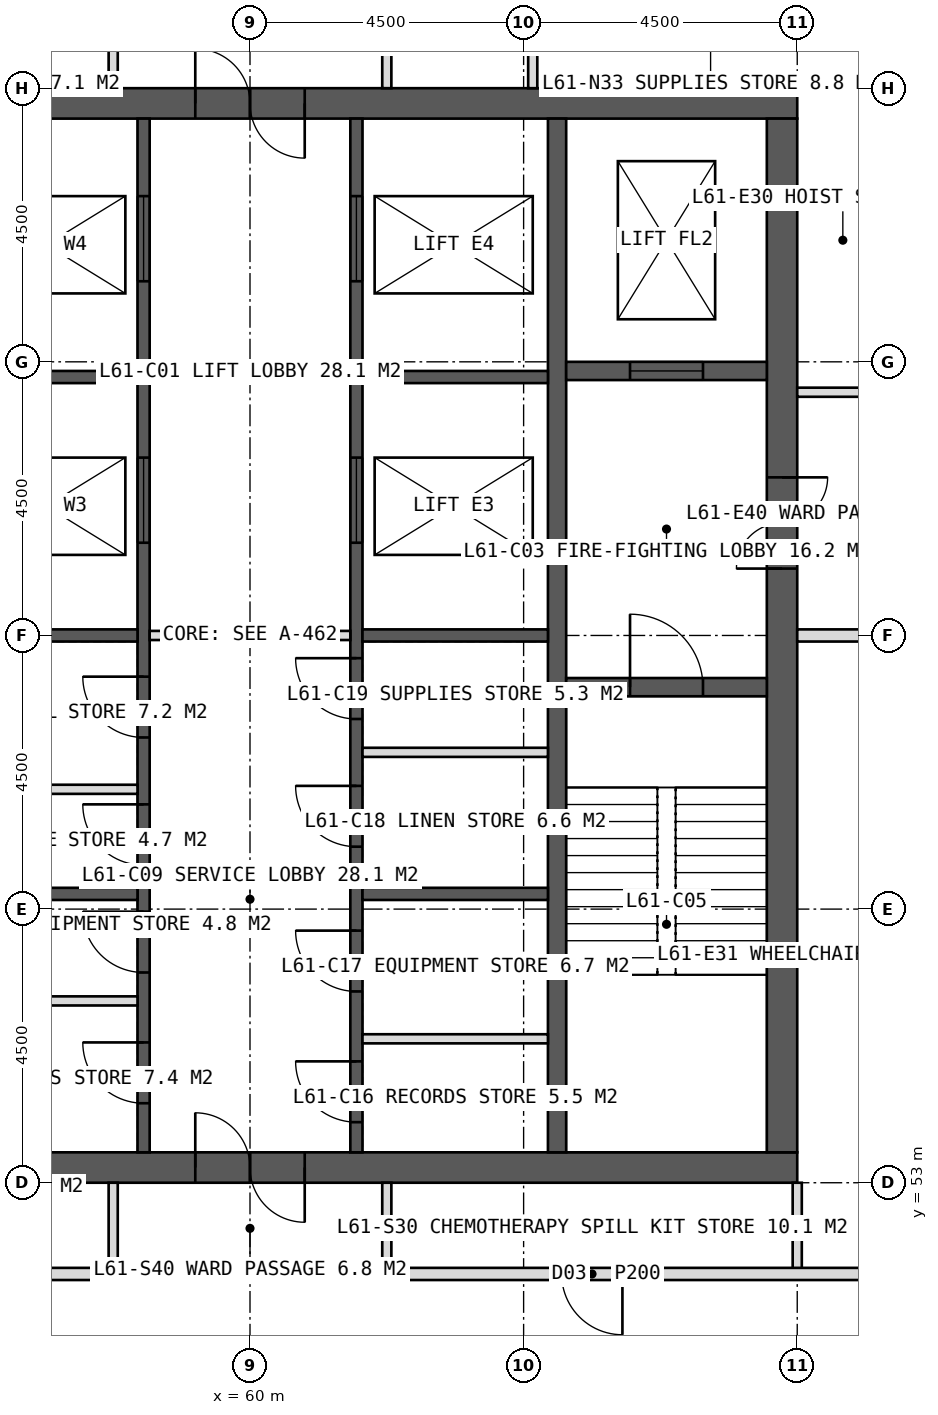
"""IFC4 building model, lengths in metres.
Left out: names, types, materials, properties, quantities, classifications, styles, units other than length and angle.
Written with IfcOpenShell. Run it as: python <this file> out.ifc"""

import sys

from ifc_helpers import new_model, si_unit, direction, frame, frame_2d, origin, place, context, subcontext, project, spatial, rectangle, extrude, element, fill, save


model = new_model("IFC4")
c1 = context("Model", 3, precision=1e-05, world=origin(), true_north=direction((0.0, 1.0)))
c2 = subcontext(c1, "Body", "Model", "MODEL_VIEW")
j1 = project(units=[si_unit("LENGTHUNIT", "METRE"), si_unit("PLANEANGLEUNIT", "RADIAN")], contexts=[c1])
p1 = place(None, origin())
s1 = spatial("IfcSite", under=j1, at=p1, CompositionType="ELEMENT")
p2 = place(p1, origin())
s2 = spatial("IfcBuilding", under=s1, at=p2, CompositionType="ELEMENT")
p3 = place(p2, frame((0.0, 0.0, 254.0)))
s3 = spatial("IfcBuildingStorey", under=s2, at=p3, CompositionType="ELEMENT", Elevation=254.0)
p4 = place(p3, frame((51.0, 70.75, 0.0), z_axis=(0.0, 0.0, 1.0), x_axis=(1.0, 0.0, 0.0)))
e1 = element("IfcWall", 1, at=p4, inside=s3, PredefinedType="SHEAR", context=c2, shape_type="SweptSolid", body=[
    extrude(rectangle(XDim=18.0, YDim=0.5, at=frame_2d((9.0, 0.0))), origin(), (0.0, 0.0, 1.0), 4.0),
])
p5 = place(p4, frame((8.1, 0.0, 0.0)))
e2 = element("IfcOpeningElement", 2, at=p5, cuts=e1, PredefinedType="OPENING", context=c2, shape_type="SweptSolid", body=[
    extrude(rectangle(XDim=1.8, YDim=2.2, at=frame_2d((0.9, 1.1))), frame((0.0, 0.26, 0.0), z_axis=(0.0, -1.0, 0.0), x_axis=(1.0, 0.0, 0.0)), (0.0, 0.0, 1.0), 0.52),
])
p6 = place(p3, frame((51.0, 53.25, 0.0), z_axis=(0.0, 0.0, 1.0), x_axis=(1.0, 0.0, 0.0)))
e3 = element("IfcWall", 3, at=p6, inside=s3, PredefinedType="SHEAR", context=c2, shape_type="SweptSolid", body=[
    extrude(rectangle(XDim=18.0, YDim=0.5, at=frame_2d((9.0, 0.0))), origin(), (0.0, 0.0, 1.0), 4.0),
])
p7 = place(p6, frame((8.1, 0.0, 0.0)))
e4 = element("IfcOpeningElement", 4, at=p7, cuts=e3, PredefinedType="OPENING", context=c2, shape_type="SweptSolid", body=[
    extrude(rectangle(XDim=1.8, YDim=2.2, at=frame_2d((0.9, 1.1))), frame((0.0, 0.26, 0.0), z_axis=(0.0, -1.0, 0.0), x_axis=(1.0, 0.0, 0.0)), (0.0, 0.0, 1.0), 0.52),
])
p8 = place(p3, frame((68.75, 53.5, 0.0), z_axis=(0.0, 0.0, 1.0), x_axis=(0.0, 1.0, 0.0)))
e5 = element("IfcWall", 5, at=p8, inside=s3, PredefinedType="SHEAR", context=c2, shape_type="SweptSolid", body=[
    extrude(rectangle(XDim=17.0, YDim=0.5, at=frame_2d((8.5, 0.0))), origin(), (0.0, 0.0, 1.0), 4.0),
])
p9 = place(p8, frame((9.6, 0.0, 0.0)))
e6 = element("IfcOpeningElement", 6, at=p9, cuts=e5, PredefinedType="OPENING", context=c2, shape_type="SweptSolid", body=[
    extrude(rectangle(XDim=1.5, YDim=2.2, at=frame_2d((0.75, 1.1))), frame((0.0, 0.26, 0.0), z_axis=(0.0, -1.0, 0.0), x_axis=(1.0, 0.0, 0.0)), (0.0, 0.0, 1.0), 0.52),
])
p10 = place(p3, frame((65.05, 53.5, 0.0), z_axis=(0.0, 0.0, 1.0), x_axis=(0.0, 1.0, 0.0)))
e7 = element("IfcWall", 7, at=p10, inside=s3, PredefinedType="SHEAR", context=c2, shape_type="SweptSolid", body=[
    extrude(rectangle(XDim=17.0, YDim=0.3, at=frame_2d((8.5, 0.0))), origin(), (0.0, 0.0, 1.0), 4.0),
])
p11 = place(p3, frame((58.25, 53.5, 0.0), z_axis=(0.0, 0.0, 1.0), x_axis=(0.0, 1.0, 0.0)))
e8 = element("IfcWall", 8, at=p11, inside=s3, PredefinedType="SHEAR", context=c2, shape_type="SweptSolid", body=[
    extrude(rectangle(XDim=17.0, YDim=0.2, at=frame_2d((8.5, 0.0))), origin(), (0.0, 0.0, 1.0), 4.0),
])
p12 = place(p11, frame((0.808, 0.0, 0.0)))
e9 = element("IfcOpeningElement", 9, at=p12, cuts=e8, PredefinedType="OPENING", context=c2, shape_type="SweptSolid", body=[
    extrude(rectangle(XDim=1.0, YDim=2.1, at=frame_2d((0.5, 1.05))), frame((0.0, 0.11, 0.0), z_axis=(0.0, -1.0, 0.0), x_axis=(1.0, 0.0, 0.0)), (0.0, 0.0, 1.0), 0.22),
])
p13 = place(p11, frame((2.958, 0.0, 0.0)))
e10 = element("IfcOpeningElement", 10, at=p13, cuts=e8, PredefinedType="OPENING", context=c2, shape_type="SweptSolid", body=[
    extrude(rectangle(XDim=1.0, YDim=2.1, at=frame_2d((0.5, 1.05))), frame((0.0, 0.11, 0.0), z_axis=(0.0, -1.0, 0.0), x_axis=(1.0, 0.0, 0.0)), (0.0, 0.0, 1.0), 0.22),
])
p14 = place(p11, frame((4.722, 0.0, 0.0)))
e11 = element("IfcOpeningElement", 11, at=p14, cuts=e8, PredefinedType="OPENING", context=c2, shape_type="SweptSolid", body=[
    extrude(rectangle(XDim=1.0, YDim=2.1, at=frame_2d((0.5, 1.05))), frame((0.0, 0.11, 0.0), z_axis=(0.0, -1.0, 0.0), x_axis=(1.0, 0.0, 0.0)), (0.0, 0.0, 1.0), 0.22),
])
p15 = place(p11, frame((6.823, 0.0, 0.0)))
e12 = element("IfcOpeningElement", 12, at=p15, cuts=e8, PredefinedType="OPENING", context=c2, shape_type="SweptSolid", body=[
    extrude(rectangle(XDim=1.0, YDim=2.1, at=frame_2d((0.5, 1.05))), frame((0.0, 0.11, 0.0), z_axis=(0.0, -1.0, 0.0), x_axis=(1.0, 0.0, 0.0)), (0.0, 0.0, 1.0), 0.22),
])
p16 = place(p11, frame((10.025, 0.0, 0.0)))
e13 = element("IfcOpeningElement", 13, at=p16, cuts=e8, PredefinedType="OPENING", context=c2, shape_type="SweptSolid", body=[
    extrude(rectangle(XDim=1.4, YDim=2.2, at=frame_2d((0.7, 1.1))), frame((0.0, 0.11, 0.0), z_axis=(0.0, -1.0, 0.0), x_axis=(1.0, 0.0, 0.0)), (0.0, 0.0, 1.0), 0.22),
])
p17 = place(p11, frame((14.325, 0.0, 0.0)))
e14 = element("IfcOpeningElement", 14, at=p17, cuts=e8, PredefinedType="OPENING", context=c2, shape_type="SweptSolid", body=[
    extrude(rectangle(XDim=1.4, YDim=2.2, at=frame_2d((0.7, 1.1))), frame((0.0, 0.11, 0.0), z_axis=(0.0, -1.0, 0.0), x_axis=(1.0, 0.0, 0.0)), (0.0, 0.0, 1.0), 0.22),
])
p18 = place(p3, frame((61.75, 53.5, 0.0), z_axis=(0.0, 0.0, 1.0), x_axis=(0.0, 1.0, 0.0)))
e15 = element("IfcWall", 15, at=p18, inside=s3, PredefinedType="SHEAR", context=c2, shape_type="SweptSolid", body=[
    extrude(rectangle(XDim=17.0, YDim=0.2, at=frame_2d((8.5, 0.0))), origin(), (0.0, 0.0, 1.0), 4.0),
])
p19 = place(p18, frame((0.496, 0.0, 0.0)))
e16 = element("IfcOpeningElement", 16, at=p19, cuts=e15, PredefinedType="OPENING", context=c2, shape_type="SweptSolid", body=[
    extrude(rectangle(XDim=1.0, YDim=2.1, at=frame_2d((0.5, 1.05))), frame((0.0, 0.11, 0.0), z_axis=(0.0, -1.0, 0.0), x_axis=(1.0, 0.0, 0.0)), (0.0, 0.0, 1.0), 0.22),
])
p20 = place(p18, frame((2.646, 0.0, 0.0)))
e17 = element("IfcOpeningElement", 17, at=p20, cuts=e15, PredefinedType="OPENING", context=c2, shape_type="SweptSolid", body=[
    extrude(rectangle(XDim=1.0, YDim=2.1, at=frame_2d((0.5, 1.05))), frame((0.0, 0.11, 0.0), z_axis=(0.0, -1.0, 0.0), x_axis=(1.0, 0.0, 0.0)), (0.0, 0.0, 1.0), 0.22),
])
p21 = place(p18, frame((5.027, 0.0, 0.0)))
e18 = element("IfcOpeningElement", 18, at=p21, cuts=e15, PredefinedType="OPENING", context=c2, shape_type="SweptSolid", body=[
    extrude(rectangle(XDim=1.0, YDim=2.1, at=frame_2d((0.5, 1.05))), frame((0.0, 0.11, 0.0), z_axis=(0.0, -1.0, 0.0), x_axis=(1.0, 0.0, 0.0)), (0.0, 0.0, 1.0), 0.22),
])
p22 = place(p18, frame((7.126, 0.0, 0.0)))
e19 = element("IfcOpeningElement", 19, at=p22, cuts=e15, PredefinedType="OPENING", context=c2, shape_type="SweptSolid", body=[
    extrude(rectangle(XDim=1.0, YDim=2.1, at=frame_2d((0.5, 1.05))), frame((0.0, 0.11, 0.0), z_axis=(0.0, -1.0, 0.0), x_axis=(1.0, 0.0, 0.0)), (0.0, 0.0, 1.0), 0.22),
])
p23 = place(p18, frame((10.025, 0.0, 0.0)))
e20 = element("IfcOpeningElement", 20, at=p23, cuts=e15, PredefinedType="OPENING", context=c2, shape_type="SweptSolid", body=[
    extrude(rectangle(XDim=1.4, YDim=2.2, at=frame_2d((0.7, 1.1))), frame((0.0, 0.11, 0.0), z_axis=(0.0, -1.0, 0.0), x_axis=(1.0, 0.0, 0.0)), (0.0, 0.0, 1.0), 0.22),
])
p24 = place(p18, frame((14.325, 0.0, 0.0)))
e21 = element("IfcOpeningElement", 21, at=p24, cuts=e15, PredefinedType="OPENING", context=c2, shape_type="SweptSolid", body=[
    extrude(rectangle(XDim=1.4, YDim=2.2, at=frame_2d((0.7, 1.1))), frame((0.0, 0.11, 0.0), z_axis=(0.0, -1.0, 0.0), x_axis=(1.0, 0.0, 0.0)), (0.0, 0.0, 1.0), 0.22),
])
for number, where, z_axis, x_axis in (
    (22, (55.1, 57.75, 0.0), (0.0, 0.0, 1.0), (1.0, 0.0, 0.0)),
    (23, (61.85, 57.75, 0.0), (0.0, 0.0, 1.0), (1.0, 0.0, 0.0)),
    (24, (55.1, 62.0, 0.0), (0.0, 0.0, 1.0), (1.0, 0.0, 0.0)),
    (25, (61.85, 62.0, 0.0), (0.0, 0.0, 1.0), (1.0, 0.0, 0.0)),
    (26, (55.1, 66.25, 0.0), (0.0, 0.0, 1.0), (1.0, 0.0, 0.0)),
    (27, (61.85, 66.25, 0.0), (0.0, 0.0, 1.0), (1.0, 0.0, 0.0)),
):
    element("IfcWall", number, at=place(p3, frame(where, z_axis=z_axis, x_axis=x_axis)), inside=s3, PredefinedType="SHEAR", context=c2, shape_type="SweptSolid", body=[
        extrude(rectangle(XDim=3.05, YDim=0.2, at=frame_2d((1.525, 0.0))), origin(), (0.0, 0.0, 1.0), 4.0),
    ])
p25 = place(p3, frame((65.2, 61.15, 0.0), z_axis=(0.0, 0.0, 1.0), x_axis=(1.0, 0.0, 0.0)))
e28 = element("IfcWall", 28, at=p25, inside=s3, PredefinedType="SHEAR", context=c2, shape_type="SweptSolid", body=[
    extrude(rectangle(XDim=3.3, YDim=0.3, at=frame_2d((1.65, 0.0))), origin(), (0.0, 0.0, 1.0), 4.0),
])
p26 = place(p25, frame((1.05, 0.0, 0.0)))
e29 = element("IfcOpeningElement", 29, at=p26, cuts=e28, PredefinedType="OPENING", context=c2, shape_type="SweptSolid", body=[
    extrude(rectangle(XDim=1.2, YDim=2.1, at=frame_2d((0.6, 1.05))), frame((0.0, 0.16, 0.0), z_axis=(0.0, -1.0, 0.0), x_axis=(1.0, 0.0, 0.0)), (0.0, 0.0, 1.0), 0.32),
])
p27 = place(p3, frame((65.2, 66.35, 0.0), z_axis=(0.0, 0.0, 1.0), x_axis=(1.0, 0.0, 0.0)))
e30 = element("IfcWall", 30, at=p27, inside=s3, PredefinedType="SHEAR", context=c2, shape_type="SweptSolid", body=[
    extrude(rectangle(XDim=3.3, YDim=0.3, at=frame_2d((1.65, 0.0))), origin(), (0.0, 0.0, 1.0), 4.0),
])
p28 = place(p27, frame((1.05, 0.0, 0.0)))
e31 = element("IfcOpeningElement", 31, at=p28, cuts=e30, PredefinedType="OPENING", context=c2, shape_type="SweptSolid", body=[
    extrude(rectangle(XDim=1.2, YDim=2.2, at=frame_2d((0.6, 1.1))), frame((0.0, 0.16, 0.0), z_axis=(0.0, -1.0, 0.0), x_axis=(1.0, 0.0, 0.0)), (0.0, 0.0, 1.0), 0.32),
])
for number, where, z_axis, x_axis in (
    (32, (57.75, 71.0, 0.0), (0.0, 0.0, 1.0), (0.0, 1.0, 0.0)),
    (33, (62.25, 71.0, 0.0), (0.0, 0.0, 1.0), (0.0, 1.0, 0.0)),
):
    element("IfcWall", number, at=place(p3, frame(where, z_axis=z_axis, x_axis=x_axis)), inside=s3, PredefinedType="PARTITIONING", context=c2, shape_type="SweptSolid", body=[
        extrude(rectangle(XDim=1.5, YDim=0.15, at=frame_2d((0.75, 0.0))), origin(), (0.0, 0.0, 1.0), 3.75),
    ])
p29 = place(p3, frame((64.65, 71.0, 0.0), z_axis=(0.0, 0.0, 1.0), x_axis=(0.0, 1.0, 0.0)))
e34 = element("IfcWall", 34, at=p29, inside=s3, PredefinedType="PARTITIONING", context=c2, shape_type="SweptSolid", body=[
    extrude(rectangle(XDim=1.5, YDim=0.15, at=frame_2d((0.75, 0.0))), origin(), (0.0, 0.0, 1.0), 2.95),
])
p30 = place(p3, frame((69.0, 53.0, 0.0), z_axis=(0.0, 0.0, 1.0), x_axis=(0.0, -1.0, 0.0)))
e35 = element("IfcWall", 35, at=p30, inside=s3, PredefinedType="PARTITIONING", context=c2, shape_type="SweptSolid", body=[
    extrude(rectangle(XDim=1.5, YDim=0.15, at=frame_2d((0.75, 0.0))), origin(), (0.0, 0.0, 1.0), 3.75),
])
p31 = place(p3, frame((70.5, 51.5, 0.0), z_axis=(0.0, 0.0, 1.0), x_axis=(-1.0, 0.0, 0.0)))
e36 = element("IfcWall", 36, at=p31, inside=s3, PredefinedType="PARTITIONING", context=c2, shape_type="SweptSolid", body=[
    extrude(rectangle(XDim=8.25, YDim=0.2, at=frame_2d((4.125, 0.0))), origin(), (0.0, 0.0, 1.0), 3.75),
])
p32 = place(p31, frame((4.375, 0.0, 0.0)))
e37 = element("IfcOpeningElement", 37, at=p32, cuts=e36, PredefinedType="OPENING", context=c2, shape_type="SweptSolid", body=[
    extrude(rectangle(XDim=1.0, YDim=2.1, at=frame_2d((0.5, 1.05))), frame((0.0, 0.11, 0.0), z_axis=(0.0, -1.0, 0.0), x_axis=(1.0, 0.0, 0.0)), (0.0, 0.0, 1.0), 0.22),
])
p33 = place(p3, frame((57.75, 51.5, 0.0), z_axis=(0.0, 0.0, 1.0), x_axis=(-1.0, 0.0, 0.0)))
e38 = element("IfcWall", 38, at=p33, inside=s3, PredefinedType="PARTITIONING", context=c2, shape_type="SweptSolid", body=[
    extrude(rectangle(XDim=8.25, YDim=0.2, at=frame_2d((4.125, 0.0))), origin(), (0.0, 0.0, 1.0), 3.75),
])
p34 = place(p33, frame((3.625, 0.0, 0.0)))
e39 = element("IfcOpeningElement", 39, at=p34, cuts=e38, PredefinedType="OPENING", context=c2, shape_type="SweptSolid", body=[
    extrude(rectangle(XDim=1.0, YDim=2.1, at=frame_2d((0.5, 1.05))), frame((0.0, 0.11, 0.0), z_axis=(0.0, -1.0, 0.0), x_axis=(1.0, 0.0, 0.0)), (0.0, 0.0, 1.0), 0.22),
])
for number, where, z_axis, x_axis in (
    (40, (62.25, 53.0, 0.0), (0.0, 0.0, 1.0), (0.0, -1.0, 0.0)),
    (41, (57.75, 53.0, 0.0), (0.0, 0.0, 1.0), (0.0, -1.0, 0.0)),
    (42, (69.0, 71.0, 0.0), (0.0, 0.0, 1.0), (1.0, 0.0, 0.0)),
    (43, (69.0, 66.0, 0.0), (0.0, 0.0, 1.0), (1.0, 0.0, 0.0)),
):
    element("IfcWall", number, at=place(p3, frame(where, z_axis=z_axis, x_axis=x_axis)), inside=s3, PredefinedType="PARTITIONING", context=c2, shape_type="SweptSolid", body=[
        extrude(rectangle(XDim=1.5, YDim=0.15, at=frame_2d((0.75, 0.0))), origin(), (0.0, 0.0, 1.0), 3.75),
    ])
p35 = place(p3, frame((69.0, 62.0, 0.0), z_axis=(0.0, 0.0, 1.0), x_axis=(1.0, 0.0, 0.0)))
e44 = element("IfcWall", 44, at=p35, inside=s3, PredefinedType="SOLIDWALL", context=c2, shape_type="SweptSolid", body=[
    extrude(rectangle(XDim=1.5, YDim=0.2, at=frame_2d((0.75, 0.0))), origin(), (0.0, 0.0, 1.0), 2.75),
])
for number, where, z_axis, x_axis in (
    (45, (55.1, 55.99, 0.0), (0.0, 0.0, 1.0), (1.0, 0.0, 0.0)),
    (46, (61.85, 55.367, 0.0), (0.0, 0.0, 1.0), (1.0, 0.0, 0.0)),
    (47, (55.1, 59.47, 0.0), (0.0, 0.0, 1.0), (1.0, 0.0, 0.0)),
    (48, (61.85, 60.078, 0.0), (0.0, 0.0, 1.0), (1.0, 0.0, 0.0)),
):
    element("IfcWall", number, at=place(p3, frame(where, z_axis=z_axis, x_axis=x_axis)), inside=s3, PredefinedType="PARTITIONING", context=c2, shape_type="SweptSolid", body=[
        extrude(rectangle(XDim=3.05, YDim=0.15, at=frame_2d((1.525, 0.0))), origin(), (0.0, 0.0, 1.0), 3.75),
    ])
p36 = place(p3, frame((58.35, 62.0, 0.0), z_axis=(0.0, 0.0, 1.0), x_axis=(1.0, 0.0, 0.0)))
e49 = element("IfcWall", 49, at=p36, inside=s3, PredefinedType="PARTITIONING", context=c2, shape_type="SweptSolid", body=[
    extrude(rectangle(XDim=3.3, YDim=0.15, at=frame_2d((1.65, 0.0))), origin(), (0.0, 0.0, 1.0), 3.75),
])
p37 = place(p32, origin())
e50 = element("IfcDoor", 50, at=p37, inside=s3, OperationType="SINGLE_SWING_LEFT", PredefinedType="DOOR", context=c2, shape_type="SweptSolid", body=[
    extrude(rectangle(XDim=1.0, YDim=2.1, at=frame_2d((0.5, 1.05))), frame((0.0, 0.025, 0.0), z_axis=(0.0, -1.0, 0.0), x_axis=(1.0, 0.0, 0.0)), (0.0, 0.0, 1.0), 0.05),
])
fill(e37, e50)
p38 = place(p5, origin())
e51 = element("IfcDoor", 51, at=p38, inside=s3, OperationType="DOUBLE_DOOR_SINGLE_SWING", PredefinedType="DOOR", context=c2, shape_type="SweptSolid", body=[
    extrude(rectangle(XDim=1.8, YDim=2.2, at=frame_2d((0.9, 1.1))), frame((0.0, 0.025, 0.0), z_axis=(0.0, -1.0, 0.0), x_axis=(1.0, 0.0, 0.0)), (0.0, 0.0, 1.0), 0.05),
])
fill(e2, e51)
p39 = place(p9, origin())
e52 = element("IfcDoor", 52, at=p39, inside=s3, OperationType="DOUBLE_DOOR_SINGLE_SWING", PredefinedType="DOOR", context=c2, shape_type="SweptSolid", body=[
    extrude(rectangle(XDim=1.5, YDim=2.2, at=frame_2d((0.75, 1.1))), frame((0.0, 0.025, 0.0), z_axis=(0.0, -1.0, 0.0), x_axis=(1.0, 0.0, 0.0)), (0.0, 0.0, 1.0), 0.05),
])
fill(e6, e52)
p40 = place(p26, origin())
e53 = element("IfcDoor", 53, at=p40, inside=s3, OperationType="SINGLE_SWING_LEFT", PredefinedType="DOOR", context=c2, shape_type="SweptSolid", body=[
    extrude(rectangle(XDim=1.2, YDim=2.1, at=frame_2d((0.6, 1.05))), frame((0.0, 0.025, 0.0), z_axis=(0.0, -1.0, 0.0), x_axis=(1.0, 0.0, 0.0)), (0.0, 0.0, 1.0), 0.05),
])
fill(e29, e53)
p41 = place(p28, origin())
e54 = element("IfcDoor", 54, at=p41, inside=s3, OperationType="SLIDING_TO_LEFT", PredefinedType="DOOR", context=c2, shape_type="SweptSolid", body=[
    extrude(rectangle(XDim=1.2, YDim=2.2, at=frame_2d((0.6, 1.1))), frame((0.0, 0.025, 0.0), z_axis=(0.0, -1.0, 0.0), x_axis=(1.0, 0.0, 0.0)), (0.0, 0.0, 1.0), 0.05),
])
fill(e31, e54)
p42 = place(p12, origin())
e55 = element("IfcDoor", 55, at=p42, inside=s3, OperationType="SINGLE_SWING_RIGHT", PredefinedType="DOOR", context=c2, shape_type="SweptSolid", body=[
    extrude(rectangle(XDim=1.0, YDim=2.1, at=frame_2d((0.5, 1.05))), frame((0.0, 0.025, 0.0), z_axis=(0.0, -1.0, 0.0), x_axis=(1.0, 0.0, 0.0)), (0.0, 0.0, 1.0), 0.05),
])
fill(e9, e55)
p43 = place(p13, origin())
e56 = element("IfcDoor", 56, at=p43, inside=s3, OperationType="SINGLE_SWING_RIGHT", PredefinedType="DOOR", context=c2, shape_type="SweptSolid", body=[
    extrude(rectangle(XDim=1.0, YDim=2.1, at=frame_2d((0.5, 1.05))), frame((0.0, 0.025, 0.0), z_axis=(0.0, -1.0, 0.0), x_axis=(1.0, 0.0, 0.0)), (0.0, 0.0, 1.0), 0.05),
])
fill(e10, e56)
p44 = place(p19, origin())
e57 = element("IfcDoor", 57, at=p44, inside=s3, OperationType="SINGLE_SWING_RIGHT", PredefinedType="DOOR", context=c2, shape_type="SweptSolid", body=[
    extrude(rectangle(XDim=1.0, YDim=2.1, at=frame_2d((0.5, 1.05))), frame((0.0, 0.025, 0.0), z_axis=(0.0, -1.0, 0.0), x_axis=(1.0, 0.0, 0.0)), (0.0, 0.0, 1.0), 0.05),
])
fill(e16, e57)
p45 = place(p20, origin())
e58 = element("IfcDoor", 58, at=p45, inside=s3, OperationType="SINGLE_SWING_RIGHT", PredefinedType="DOOR", context=c2, shape_type="SweptSolid", body=[
    extrude(rectangle(XDim=1.0, YDim=2.1, at=frame_2d((0.5, 1.05))), frame((0.0, 0.025, 0.0), z_axis=(0.0, -1.0, 0.0), x_axis=(1.0, 0.0, 0.0)), (0.0, 0.0, 1.0), 0.05),
])
fill(e17, e58)
p46 = place(p14, origin())
e59 = element("IfcDoor", 59, at=p46, inside=s3, OperationType="SINGLE_SWING_RIGHT", PredefinedType="DOOR", context=c2, shape_type="SweptSolid", body=[
    extrude(rectangle(XDim=1.0, YDim=2.1, at=frame_2d((0.5, 1.05))), frame((0.0, 0.025, 0.0), z_axis=(0.0, -1.0, 0.0), x_axis=(1.0, 0.0, 0.0)), (0.0, 0.0, 1.0), 0.05),
])
fill(e11, e59)
p47 = place(p15, origin())
e60 = element("IfcDoor", 60, at=p47, inside=s3, OperationType="SINGLE_SWING_RIGHT", PredefinedType="DOOR", context=c2, shape_type="SweptSolid", body=[
    extrude(rectangle(XDim=1.0, YDim=2.1, at=frame_2d((0.5, 1.05))), frame((0.0, 0.025, 0.0), z_axis=(0.0, -1.0, 0.0), x_axis=(1.0, 0.0, 0.0)), (0.0, 0.0, 1.0), 0.05),
])
fill(e12, e60)
p48 = place(p21, origin())
e61 = element("IfcDoor", 61, at=p48, inside=s3, OperationType="SINGLE_SWING_RIGHT", PredefinedType="DOOR", context=c2, shape_type="SweptSolid", body=[
    extrude(rectangle(XDim=1.0, YDim=2.1, at=frame_2d((0.5, 1.05))), frame((0.0, 0.025, 0.0), z_axis=(0.0, -1.0, 0.0), x_axis=(1.0, 0.0, 0.0)), (0.0, 0.0, 1.0), 0.05),
])
fill(e18, e61)
p49 = place(p22, origin())
e62 = element("IfcDoor", 62, at=p49, inside=s3, OperationType="SINGLE_SWING_RIGHT", PredefinedType="DOOR", context=c2, shape_type="SweptSolid", body=[
    extrude(rectangle(XDim=1.0, YDim=2.1, at=frame_2d((0.5, 1.05))), frame((0.0, 0.025, 0.0), z_axis=(0.0, -1.0, 0.0), x_axis=(1.0, 0.0, 0.0)), (0.0, 0.0, 1.0), 0.05),
])
fill(e19, e62)
p50 = place(p16, origin())
e63 = element("IfcDoor", 63, at=p50, inside=s3, OperationType="SLIDING_TO_LEFT", PredefinedType="DOOR", context=c2, shape_type="SweptSolid", body=[
    extrude(rectangle(XDim=1.4, YDim=2.2, at=frame_2d((0.7, 1.1))), frame((0.0, 0.025, 0.0), z_axis=(0.0, -1.0, 0.0), x_axis=(1.0, 0.0, 0.0)), (0.0, 0.0, 1.0), 0.05),
])
fill(e13, e63)
p51 = place(p23, origin())
e64 = element("IfcDoor", 64, at=p51, inside=s3, OperationType="SLIDING_TO_LEFT", PredefinedType="DOOR", context=c2, shape_type="SweptSolid", body=[
    extrude(rectangle(XDim=1.4, YDim=2.2, at=frame_2d((0.7, 1.1))), frame((0.0, 0.025, 0.0), z_axis=(0.0, -1.0, 0.0), x_axis=(1.0, 0.0, 0.0)), (0.0, 0.0, 1.0), 0.05),
])
fill(e20, e64)
p52 = place(p17, origin())
e65 = element("IfcDoor", 65, at=p52, inside=s3, OperationType="SLIDING_TO_LEFT", PredefinedType="DOOR", context=c2, shape_type="SweptSolid", body=[
    extrude(rectangle(XDim=1.4, YDim=2.2, at=frame_2d((0.7, 1.1))), frame((0.0, 0.025, 0.0), z_axis=(0.0, -1.0, 0.0), x_axis=(1.0, 0.0, 0.0)), (0.0, 0.0, 1.0), 0.05),
])
fill(e14, e65)
p53 = place(p24, origin())
e66 = element("IfcDoor", 66, at=p53, inside=s3, OperationType="SLIDING_TO_LEFT", PredefinedType="DOOR", context=c2, shape_type="SweptSolid", body=[
    extrude(rectangle(XDim=1.4, YDim=2.2, at=frame_2d((0.7, 1.1))), frame((0.0, 0.025, 0.0), z_axis=(0.0, -1.0, 0.0), x_axis=(1.0, 0.0, 0.0)), (0.0, 0.0, 1.0), 0.05),
])
fill(e21, e66)
p54 = place(p7, origin())
e67 = element("IfcDoor", 67, at=p54, inside=s3, OperationType="DOUBLE_DOOR_SINGLE_SWING", PredefinedType="DOOR", context=c2, shape_type="SweptSolid", body=[
    extrude(rectangle(XDim=1.8, YDim=2.2, at=frame_2d((0.9, 1.1))), frame((0.0, 0.025, 0.0), z_axis=(0.0, -1.0, 0.0), x_axis=(1.0, 0.0, 0.0)), (0.0, 0.0, 1.0), 0.05),
])
fill(e4, e67)
save(model, sys.argv[1])
